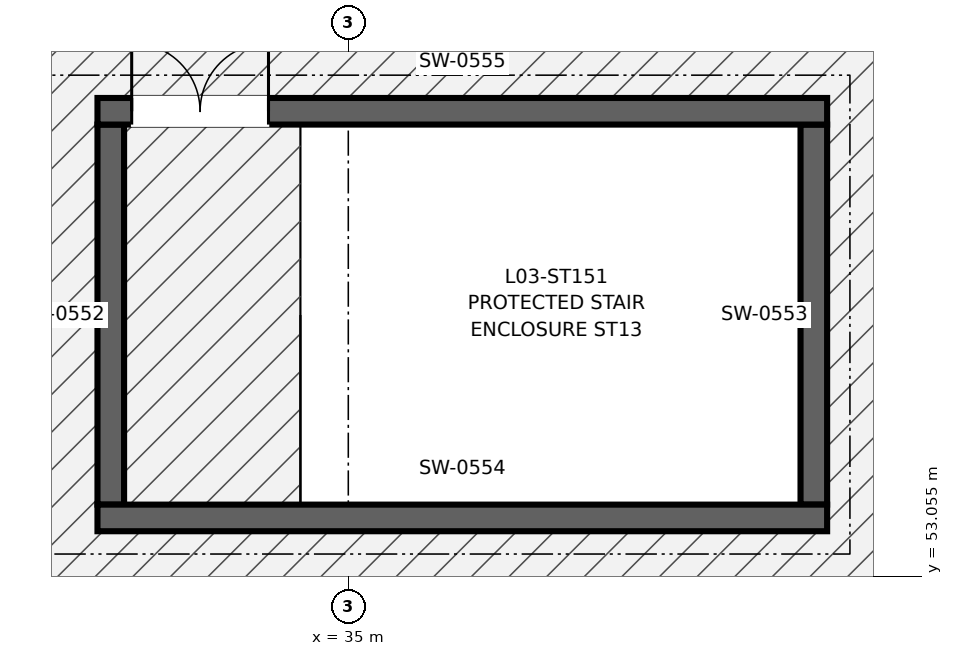
"""IFC4 building model, lengths in metres.
Left out: names, types, materials, properties, quantities, classifications, styles, units other than length and angle.
Written with IfcOpenShell. Run it as: python <this file> out.ifc"""

import sys

from ifc_helpers import new_model, si_unit, direction, frame, frame_2d, origin, place, context, subcontext, project, spatial, rectangle, extrude, element, fill, save


model = new_model("IFC4")
c1 = context("Model", 3, precision=1e-05, world=origin(), true_north=direction((0.0, 1.0)))
c2 = subcontext(c1, "Body", "Model", "MODEL_VIEW")
j1 = project(units=[si_unit("LENGTHUNIT", "METRE"), si_unit("PLANEANGLEUNIT", "RADIAN")], contexts=[c1])
p1 = place(None, origin())
s1 = spatial("IfcSite", under=j1, at=p1, CompositionType="ELEMENT")
p2 = place(p1, origin())
s2 = spatial("IfcBuilding", under=s1, at=p2, CompositionType="ELEMENT")
p3 = place(p2, frame((0.0, 0.0, 13.5)))
s3 = spatial("IfcBuildingStorey", under=s2, at=p3, CompositionType="ELEMENT", Elevation=13.5)
for number, where, z_axis, x_axis in (
    (1, (31.875, 54.0, 0.0), (0.0, 0.0, 1.0), (0.0, 1.0, 0.0)),
    (2, (41.125, 54.0, 0.0), (0.0, 0.0, 1.0), (0.0, 1.0, 0.0)),
):
    element("IfcWall", number, at=place(p3, frame(where, z_axis=z_axis, x_axis=x_axis)), inside=s3, PredefinedType="SHEAR", context=c2, shape_type="SweptSolid", body=[
        extrude(rectangle(XDim=5.0, YDim=0.35, at=frame_2d((2.5, 0.0))), origin(), (0.0, 0.0, 1.0), 4.305),
    ])
p4 = place(p3, frame((31.7, 53.825, 0.0), z_axis=(0.0, 0.0, 1.0), x_axis=(1.0, 0.0, 0.0)))
e3 = element("IfcWall", 3, at=p4, inside=s3, PredefinedType="SHEAR", context=c2, shape_type="SweptSolid", body=[
    extrude(rectangle(XDim=9.6, YDim=0.35, at=frame_2d((4.8, 0.0))), origin(), (0.0, 0.0, 1.0), 4.305),
])
p5 = place(p3, frame((31.7, 59.175, 0.0), z_axis=(0.0, 0.0, 1.0), x_axis=(1.0, 0.0, 0.0)))
e4 = element("IfcWall", 4, at=p5, inside=s3, PredefinedType="SHEAR", context=c2, shape_type="SweptSolid", body=[
    extrude(rectangle(XDim=9.6, YDim=0.35, at=frame_2d((4.8, 0.0))), origin(), (0.0, 0.0, 1.0), 4.305),
])
p6 = place(p5, frame((0.45, 0.0, 0.0)))
e5 = element("IfcOpeningElement", 5, at=p6, cuts=e4, PredefinedType="OPENING", context=c2, shape_type="SweptSolid", body=[
    extrude(rectangle(XDim=1.8, YDim=2.35, at=frame_2d((0.9, 1.175))), frame((0.0, 0.185, 0.0), z_axis=(0.0, -1.0, 0.0), x_axis=(1.0, 0.0, 0.0)), (0.0, 0.0, 1.0), 0.37),
])
p7 = place(p6, origin())
e6 = element("IfcDoor", 6, at=p7, inside=s3, OperationType="DOUBLE_DOOR_SINGLE_SWING", PredefinedType="DOOR", context=c2, shape_type="SweptSolid", body=[
    extrude(rectangle(XDim=1.8, YDim=2.35, at=frame_2d((0.9, 1.175))), frame((0.0, 0.025, 0.0), z_axis=(0.0, -1.0, 0.0), x_axis=(1.0, 0.0, 0.0)), (0.0, 0.0, 1.0), 0.05),
])
fill(e5, e6)
save(model, sys.argv[1])
